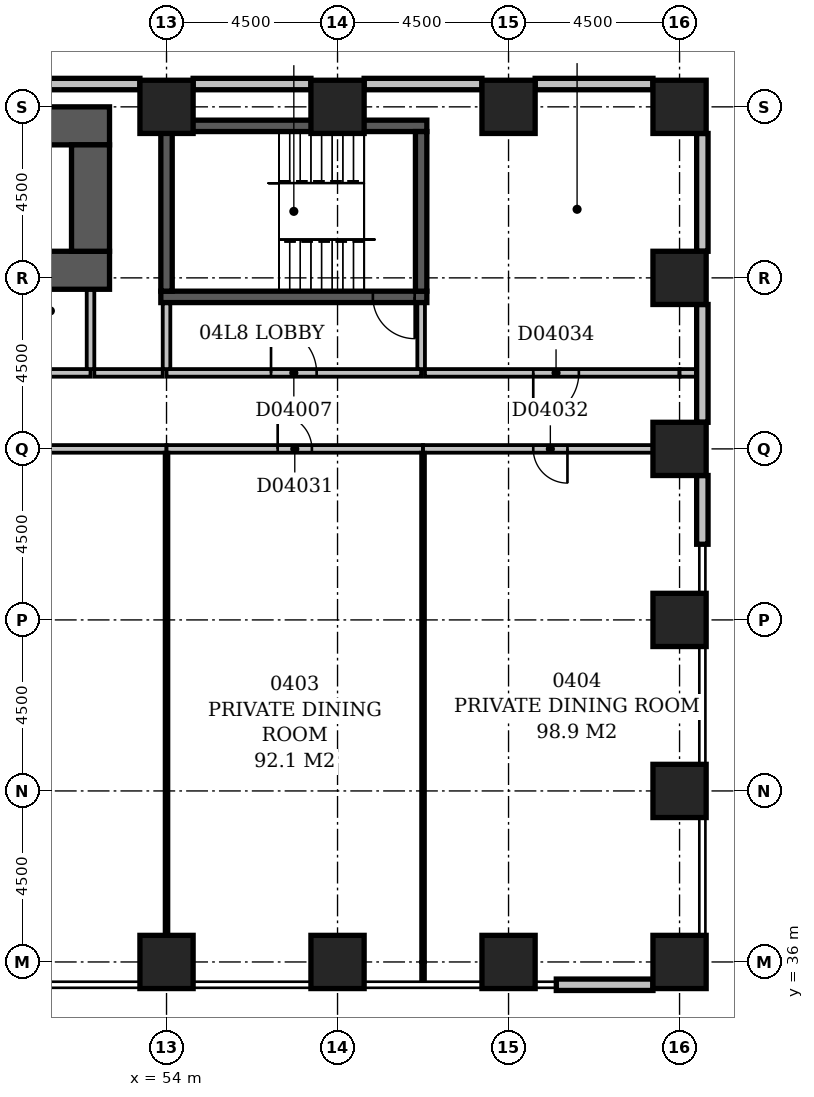
"""IFC4 building model, lengths in metres.
Left out: names, types, materials, properties, quantities, classifications, styles, units other than length and angle.
Written with IfcOpenShell. Run it as: python <this file> out.ifc"""

import sys

from ifc_helpers import new_model, si_unit, direction, frame, frame_2d, origin, origin_2d, place, context, subcontext, project, spatial, rectangle, extrude, element, fill, save


model = new_model("IFC4")
c1 = context("Model", 3, precision=1e-05, world=origin(), true_north=direction((0.0, 1.0)))
c2 = subcontext(c1, "Body", "Model", "MODEL_VIEW")
j1 = project(units=[si_unit("LENGTHUNIT", "METRE"), si_unit("PLANEANGLEUNIT", "RADIAN")], contexts=[c1])
p1 = place(None, origin())
s1 = spatial("IfcSite", under=j1, at=p1, CompositionType="ELEMENT")
p2 = place(p1, origin())
s2 = spatial("IfcBuilding", under=s1, at=p2, CompositionType="ELEMENT")
p3 = place(p2, frame((0.0, 0.0, 24.0)))
s3 = spatial("IfcBuildingStorey", under=s2, at=p3, CompositionType="ELEMENT", Elevation=24.0)
for number, where, z_axis, x_axis in (
    (1, (47.0, 54.2, -0.45), (0.0, 0.0, 1.0), (1.0, 0.0, 0.0)),
    (2, (47.0, 58.0, -0.45), (0.0, 0.0, 1.0), (1.0, 0.0, 0.0)),
):
    element("IfcWall", number, at=place(p3, frame(where, z_axis=z_axis, x_axis=x_axis)), inside=s3, PredefinedType="SHEAR", context=c2, shape_type="SweptSolid", body=[
        extrude(rectangle(XDim=5.5, YDim=1.0, at=frame_2d((2.75, 0.0))), origin(), (0.0, 0.0, 1.0), 5.15),
    ])
p4 = place(p3, frame((52.0, 54.7, -0.45), z_axis=(0.0, 0.0, 1.0), x_axis=(0.0, 1.0, 0.0)))
e3 = element("IfcWall", 3, at=p4, inside=s3, PredefinedType="SHEAR", context=c2, shape_type="SweptSolid", body=[
    extrude(rectangle(XDim=2.8, YDim=1.0, at=frame_2d((1.4, 0.0))), origin(), (0.0, 0.0, 1.0), 5.15),
])
p5 = place(p3, frame((53.85, 53.5, -0.45), z_axis=(0.0, 0.0, 1.0), x_axis=(1.0, 0.0, 0.0)))
e4 = element("IfcWall", 4, at=p5, inside=s3, PredefinedType="SHEAR", context=c2, shape_type="SweptSolid", body=[
    extrude(rectangle(XDim=7.0, YDim=0.3, at=frame_2d((3.5, 0.0))), origin(), (0.0, 0.0, 1.0), 5.15),
])
p6 = place(p5, frame((5.58, 0.0, 0.45)))
e5 = element("IfcOpeningElement", 5, at=p6, cuts=e4, PredefinedType="OPENING", context=c2, shape_type="SweptSolid", body=[
    extrude(rectangle(XDim=1.1, YDim=2.1, at=frame_2d((0.55, 1.05))), frame((0.0, 0.162, 0.0), z_axis=(0.0, -1.0, 0.0), x_axis=(1.0, 0.0, 0.0)), (0.0, 0.0, 1.0), 0.324),
])
p7 = place(p3, frame((53.85, 58.0, -0.45), z_axis=(0.0, 0.0, 1.0), x_axis=(1.0, 0.0, 0.0)))
e6 = element("IfcWall", 6, at=p7, inside=s3, PredefinedType="SHEAR", context=c2, shape_type="SweptSolid", body=[
    extrude(rectangle(XDim=7.0, YDim=0.3, at=frame_2d((3.5, 0.0))), origin(), (0.0, 0.0, 1.0), 5.15),
])
for number, where, z_axis, x_axis in (
    (7, (54.0, 53.65, -0.45), (0.0, 0.0, 1.0), (0.0, 1.0, 0.0)),
    (8, (60.7, 53.65, -0.45), (0.0, 0.0, 1.0), (0.0, 1.0, 0.0)),
):
    element("IfcWall", number, at=place(p3, frame(where, z_axis=z_axis, x_axis=x_axis)), inside=s3, PredefinedType="SHEAR", context=c2, shape_type="SweptSolid", body=[
        extrude(rectangle(XDim=4.2, YDim=0.3, at=frame_2d((2.1, 0.0))), origin(), (0.0, 0.0, 1.0), 5.15),
    ])
for number, where, z_axis, x_axis in (
    (9, (54.0, 36.0, -0.45), (0.0, 0.0, 1.0), (1.0, 0.0, 0.0)),
    (10, (58.5, 36.0, -0.45), (0.0, 0.0, 1.0), (1.0, 0.0, 0.0)),
    (11, (63.0, 36.0, -0.45), (0.0, 0.0, 1.0), (1.0, 0.0, 0.0)),
    (12, (67.5, 36.0, -0.45), (0.0, 0.0, 1.0), (1.0, 0.0, 0.0)),
    (13, (67.5, 40.5, -0.45), (0.0, 0.0, 1.0), (1.0, 0.0, 0.0)),
    (14, (67.5, 45.0, -0.45), (0.0, 0.0, 1.0), (1.0, 0.0, 0.0)),
    (15, (67.5, 49.5, -0.45), (0.0, 0.0, 1.0), (1.0, 0.0, 0.0)),
    (16, (67.5, 54.0, -0.45), (0.0, 0.0, 1.0), (1.0, 0.0, 0.0)),
    (17, (54.0, 58.5, -0.45), (0.0, 0.0, 1.0), (1.0, 0.0, 0.0)),
    (18, (58.5, 58.5, -0.45), (0.0, 0.0, 1.0), (1.0, 0.0, 0.0)),
    (19, (63.0, 58.5, -0.45), (0.0, 0.0, 1.0), (1.0, 0.0, 0.0)),
    (20, (67.5, 58.5, -0.45), (0.0, 0.0, 1.0), (1.0, 0.0, 0.0)),
):
    element("IfcColumn", number, at=place(p3, frame(where, z_axis=z_axis, x_axis=x_axis)), inside=s3, PredefinedType="COLUMN", context=c2, shape_type="SweptSolid", body=[
        extrude(rectangle(XDim=1.4, YDim=1.4, at=origin_2d()), origin(), (0.0, 0.0, 1.0), 5.15),
    ])
p8 = place(p3, frame((64.257, 35.4, 0.0), z_axis=(0.0, 0.0, 1.0), x_axis=(1.0, 0.0, 0.0)))
e21 = element("IfcWall", 21, at=p8, inside=s3, PredefinedType="STANDARD", context=c2, shape_type="SweptSolid", body=[
    extrude(rectangle(XDim=2.543, YDim=0.3, at=frame_2d((1.271, 0.0))), origin(), (0.0, 0.0, 1.0), 4.1),
])
p9 = place(p3, frame((68.1, 46.991, 0.0), z_axis=(0.0, 0.0, 1.0), x_axis=(0.0, 1.0, 0.0)))
e22 = element("IfcWall", 22, at=p9, inside=s3, PredefinedType="STANDARD", context=c2, shape_type="SweptSolid", body=[
    extrude(rectangle(XDim=1.809, YDim=0.3, at=frame_2d((0.905, 0.0))), origin(), (0.0, 0.0, 1.0), 4.1),
])
for number, where, z_axis, x_axis in (
    (23, (68.1, 50.2, 0.0), (0.0, 0.0, 1.0), (0.0, 1.0, 0.0)),
    (24, (68.1, 54.7, 0.0), (0.0, 0.0, 1.0), (0.0, 1.0, 0.0)),
    (25, (66.8, 59.1, 0.0), (0.0, 0.0, 1.0), (-1.0, 0.0, 0.0)),
    (26, (62.3, 59.1, 0.0), (0.0, 0.0, 1.0), (-1.0, 0.0, 0.0)),
    (27, (57.8, 59.1, 0.0), (0.0, 0.0, 1.0), (-1.0, 0.0, 0.0)),
    (28, (53.3, 59.1, 0.0), (0.0, 0.0, 1.0), (-1.0, 0.0, 0.0)),
):
    element("IfcWall", number, at=place(p3, frame(where, z_axis=z_axis, x_axis=x_axis)), inside=s3, PredefinedType="STANDARD", context=c2, shape_type="SweptSolid", body=[
        extrude(rectangle(XDim=3.1, YDim=0.3, at=frame_2d((1.55, 0.0))), origin(), (0.0, 0.0, 1.0), 4.1),
    ])
p10 = place(p3, frame((47.0, 51.5, 0.0), z_axis=(0.0, 0.0, 1.0), x_axis=(1.0, 0.0, 0.0)))
e29 = element("IfcWall", 29, at=p10, inside=s3, PredefinedType="PARTITIONING", context=c2, shape_type="SweptSolid", body=[
    extrude(rectangle(XDim=5.0, YDim=0.2, at=frame_2d((2.5, 0.0))), origin(), (0.0, 0.0, 1.0), 4.7),
])
p11 = place(p10, frame((1.9, 0.0, 0.0)))
e30 = element("IfcOpeningElement", 30, at=p11, cuts=e29, PredefinedType="OPENING", context=c2, shape_type="SweptSolid", body=[
    extrude(rectangle(XDim=1.2, YDim=2.1, at=frame_2d((0.6, 1.05))), frame((0.0, 0.112, 0.0), z_axis=(0.0, -1.0, 0.0), x_axis=(1.0, 0.0, 0.0)), (0.0, 0.0, 1.0), 0.224),
])
p12 = place(p3, frame((52.0, 51.6, 0.0), z_axis=(0.0, 0.0, 1.0), x_axis=(0.0, 1.0, 0.0)))
e31 = element("IfcWall", 31, at=p12, inside=s3, PredefinedType="PARTITIONING", context=c2, shape_type="SweptSolid", body=[
    extrude(rectangle(XDim=2.08, YDim=0.2, at=frame_2d((1.04, 0.0))), origin(), (0.0, 0.0, 1.0), 4.7),
])
p13 = place(p3, frame((54.0, 51.5, 0.0), z_axis=(0.0, 0.0, 1.0), x_axis=(1.0, 0.0, 0.0)))
e32 = element("IfcWall", 32, at=p13, inside=s3, PredefinedType="PARTITIONING", context=c2, shape_type="SweptSolid", body=[
    extrude(rectangle(XDim=6.7, YDim=0.2, at=frame_2d((3.35, 0.0))), origin(), (0.0, 0.0, 1.0), 4.7),
])
p14 = place(p13, frame((2.75, 0.0, 0.0)))
e33 = element("IfcOpeningElement", 33, at=p14, cuts=e32, PredefinedType="OPENING", context=c2, shape_type="SweptSolid", body=[
    extrude(rectangle(XDim=1.2, YDim=2.1, at=frame_2d((0.6, 1.05))), frame((0.0, 0.112, 0.0), z_axis=(0.0, -1.0, 0.0), x_axis=(1.0, 0.0, 0.0)), (0.0, 0.0, 1.0), 0.224),
])
p15 = place(p3, frame((60.7, 51.6, 0.0), z_axis=(0.0, 0.0, 1.0), x_axis=(0.0, 1.0, 0.0)))
e34 = element("IfcWall", 34, at=p15, inside=s3, PredefinedType="PARTITIONING", context=c2, shape_type="SweptSolid", body=[
    extrude(rectangle(XDim=1.73, YDim=0.2, at=frame_2d((0.865, 0.0))), origin(), (0.0, 0.0, 1.0), 4.7),
])
p16 = place(p3, frame((54.0, 51.6, 0.0), z_axis=(0.0, 0.0, 1.0), x_axis=(0.0, 1.0, 0.0)))
e35 = element("IfcWall", 35, at=p16, inside=s3, PredefinedType="PARTITIONING", context=c2, shape_type="SweptSolid", body=[
    extrude(rectangle(XDim=1.73, YDim=0.2, at=frame_2d((0.865, 0.0))), origin(), (0.0, 0.0, 1.0), 4.0),
])
p17 = place(p3, frame((60.75, 36.0, 0.0), z_axis=(0.0, 0.0, 1.0), x_axis=(0.0, -1.0, 0.0)))
e36 = element("IfcWall", 36, at=p17, inside=s3, PredefinedType="PARTITIONING", context=c2, shape_type="SweptSolid", body=[
    extrude(rectangle(XDim=0.45, YDim=0.1, at=frame_2d((0.225, 0.0))), origin(), (0.0, 0.0, 1.0), 4.7),
])
p18 = place(p3, frame((36.0, 49.5, 0.0), z_axis=(0.0, 0.0, 1.0), x_axis=(1.0, 0.0, 0.0)))
e37 = element("IfcWall", 37, at=p18, inside=s3, PredefinedType="PARTITIONING", context=c2, shape_type="SweptSolid", body=[
    extrude(rectangle(XDim=18.0, YDim=0.2, at=frame_2d((9.0, 0.0))), origin(), (0.0, 0.0, 1.0), 4.7),
])
p19 = place(p18, frame((9.65, 0.0, 0.0)))
e38 = element("IfcOpeningElement", 38, at=p19, cuts=e37, PredefinedType="OPENING", context=c2, shape_type="SweptSolid", body=[
    extrude(rectangle(XDim=1.8, YDim=2.4, at=frame_2d((0.9, 1.2))), frame((0.0, 0.112, 0.0), z_axis=(0.0, -1.0, 0.0), x_axis=(1.0, 0.0, 0.0)), (0.0, 0.0, 1.0), 0.224),
])
p20 = place(p3, frame((54.0, 49.4, 0.0), z_axis=(0.0, 0.0, 1.0), x_axis=(0.0, -1.0, 0.0)))
e39 = element("IfcWall", 39, at=p20, inside=s3, PredefinedType="PARTITIONING", context=c2, shape_type="SweptSolid", body=[
    extrude(rectangle(XDim=13.4, YDim=0.1, at=frame_2d((6.7, 0.0))), origin(), (0.0, 0.0, 1.0), 4.0),
])
p21 = place(p3, frame((54.0, 49.5, 0.0), z_axis=(0.0, 0.0, 1.0), x_axis=(1.0, 0.0, 0.0)))
e40 = element("IfcWall", 40, at=p21, inside=s3, PredefinedType="PARTITIONING", context=c2, shape_type="SweptSolid", body=[
    extrude(rectangle(XDim=6.75, YDim=0.2, at=frame_2d((3.375, 0.0))), origin(), (0.0, 0.0, 1.0), 4.7),
])
p22 = place(p21, frame((2.925, 0.0, 0.0)))
e41 = element("IfcOpeningElement", 41, at=p22, cuts=e40, PredefinedType="OPENING", context=c2, shape_type="SweptSolid", body=[
    extrude(rectangle(XDim=0.9, YDim=2.1, at=frame_2d((0.45, 1.05))), frame((0.0, 0.112, 0.0), z_axis=(0.0, -1.0, 0.0), x_axis=(1.0, 0.0, 0.0)), (0.0, 0.0, 1.0), 0.224),
])
p23 = place(p3, frame((60.75, 49.4, 0.0), z_axis=(0.0, 0.0, 1.0), x_axis=(0.0, -1.0, 0.0)))
e42 = element("IfcWall", 42, at=p23, inside=s3, PredefinedType="PARTITIONING", context=c2, shape_type="SweptSolid", body=[
    extrude(rectangle(XDim=13.4, YDim=0.1, at=frame_2d((6.7, 0.0))), origin(), (0.0, 0.0, 1.0), 4.7),
])
p24 = place(p3, frame((60.75, 49.5, 0.0), z_axis=(0.0, 0.0, 1.0), x_axis=(1.0, 0.0, 0.0)))
e43 = element("IfcWall", 43, at=p24, inside=s3, PredefinedType="PARTITIONING", context=c2, shape_type="SweptSolid", body=[
    extrude(rectangle(XDim=6.75, YDim=0.2, at=frame_2d((3.375, 0.0))), origin(), (0.0, 0.0, 1.0), 4.7),
])
p25 = place(p24, frame((2.9, 0.0, 0.0)))
e44 = element("IfcOpeningElement", 44, at=p25, cuts=e43, PredefinedType="OPENING", context=c2, shape_type="SweptSolid", body=[
    extrude(rectangle(XDim=0.9, YDim=2.1, at=frame_2d((0.45, 1.05))), frame((0.0, 0.112, 0.0), z_axis=(0.0, -1.0, 0.0), x_axis=(1.0, 0.0, 0.0)), (0.0, 0.0, 1.0), 0.224),
])
p26 = place(p3, frame((53.9, 51.5, 0.0), z_axis=(0.0, 0.0, 1.0), x_axis=(-1.0, 0.0, 0.0)))
e45 = element("IfcWall", 45, at=p26, inside=s3, PredefinedType="PARTITIONING", context=c2, shape_type="SweptSolid", body=[
    extrude(rectangle(XDim=1.8, YDim=0.2, at=frame_2d((0.9, 0.0))), origin(), (0.0, 0.0, 1.0), 4.7),
])
p27 = place(p3, frame((67.5, 51.5, 0.0), z_axis=(0.0, 0.0, 1.0), x_axis=(-1.0, 0.0, 0.0)))
e46 = element("IfcWall", 46, at=p27, inside=s3, PredefinedType="PARTITIONING", context=c2, shape_type="SweptSolid", body=[
    extrude(rectangle(XDim=6.7, YDim=0.2, at=frame_2d((3.35, 0.0))), origin(), (0.0, 0.0, 1.0), 4.7),
])
p28 = place(p27, frame((2.65, 0.0, 0.0)))
e47 = element("IfcOpeningElement", 47, at=p28, cuts=e46, PredefinedType="OPENING", context=c2, shape_type="SweptSolid", body=[
    extrude(rectangle(XDim=1.2, YDim=2.1, at=frame_2d((0.6, 1.05))), frame((0.0, 0.112, 0.0), z_axis=(0.0, -1.0, 0.0), x_axis=(1.0, 0.0, 0.0)), (0.0, 0.0, 1.0), 0.224),
])
p29 = place(p3, frame((67.95, 51.5, 0.0), z_axis=(0.0, 0.0, 1.0), x_axis=(-1.0, 0.0, 0.0)))
e48 = element("IfcWall", 48, at=p29, inside=s3, PredefinedType="PARTITIONING", context=c2, shape_type="SweptSolid", body=[
    extrude(rectangle(XDim=0.45, YDim=0.2, at=frame_2d((0.225, 0.0))), origin(), (0.0, 0.0, 1.0), 4.7),
])
p30 = place(p14, origin())
e49 = element("IfcDoor", 49, at=p30, inside=s3, OperationType="SINGLE_SWING_LEFT", PredefinedType="DOOR", context=c2, shape_type="SweptSolid", body=[
    extrude(rectangle(XDim=1.2, YDim=2.1, at=frame_2d((0.6, 1.05))), frame((0.0, 0.025, 0.0), z_axis=(0.0, -1.0, 0.0), x_axis=(1.0, 0.0, 0.0)), (0.0, 0.0, 1.0), 0.05),
])
fill(e33, e49)
p31 = place(p6, origin())
e50 = element("IfcDoor", 50, at=p31, inside=s3, OperationType="SINGLE_SWING_RIGHT", PredefinedType="DOOR", context=c2, shape_type="SweptSolid", body=[
    extrude(rectangle(XDim=1.1, YDim=2.1, at=frame_2d((0.55, 1.05))), frame((0.0, 0.025, 0.0), z_axis=(0.0, -1.0, 0.0), x_axis=(1.0, 0.0, 0.0)), (0.0, 0.0, 1.0), 0.05),
])
fill(e5, e50)
p32 = place(p22, origin())
e51 = element("IfcDoor", 51, at=p32, inside=s3, OperationType="SINGLE_SWING_LEFT", PredefinedType="DOOR", context=c2, shape_type="SweptSolid", body=[
    extrude(rectangle(XDim=0.9, YDim=2.1, at=frame_2d((0.45, 1.05))), frame((0.0, 0.025, 0.0), z_axis=(0.0, -1.0, 0.0), x_axis=(1.0, 0.0, 0.0)), (0.0, 0.0, 1.0), 0.05),
])
fill(e41, e51)
p33 = place(p25, origin())
e52 = element("IfcDoor", 52, at=p33, inside=s3, OperationType="SINGLE_SWING_RIGHT", PredefinedType="DOOR", context=c2, shape_type="SweptSolid", body=[
    extrude(rectangle(XDim=0.9, YDim=2.1, at=frame_2d((0.45, 1.05))), frame((0.0, 0.025, 0.0), z_axis=(0.0, -1.0, 0.0), x_axis=(1.0, 0.0, 0.0)), (0.0, 0.0, 1.0), 0.05),
])
fill(e44, e52)
p34 = place(p28, frame((1.2, 0.0, 0.0), z_axis=(0.0, 0.0, 1.0), x_axis=(-1.0, 0.0, 0.0)))
e53 = element("IfcDoor", 53, at=p34, inside=s3, OperationType="SINGLE_SWING_LEFT", PredefinedType="DOOR", context=c2, shape_type="SweptSolid", body=[
    extrude(rectangle(XDim=1.2, YDim=2.1, at=frame_2d((0.6, 1.05))), frame((0.0, 0.025, 0.0), z_axis=(0.0, -1.0, 0.0), x_axis=(1.0, 0.0, 0.0)), (0.0, 0.0, 1.0), 0.05),
])
fill(e47, e53)
save(model, sys.argv[1])
